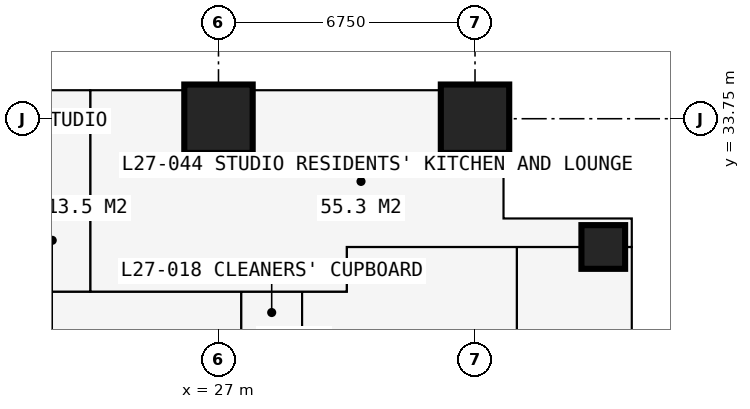
"""IFC4 building model, lengths in metres.
Left out: names, types, materials, properties, quantities, classifications, styles, units other than length and angle.
Written with IfcOpenShell. Run it as: python <this file> out.ifc"""

import sys

from ifc_helpers import new_model, si_unit, direction, frame, frame_2d, origin, origin_2d, place, context, subcontext, project, spatial, rectangle, extrude, element, fill, save


model = new_model("IFC4")
c1 = context("Model", 3, precision=1e-05, world=origin(), true_north=direction((0.0, 1.0)))
c2 = subcontext(c1, "Body", "Model", "MODEL_VIEW")
j1 = project(units=[si_unit("LENGTHUNIT", "METRE"), si_unit("PLANEANGLEUNIT", "RADIAN")], contexts=[c1])
p1 = place(None, origin())
s1 = spatial("IfcSite", under=j1, at=p1, CompositionType="ELEMENT")
p2 = place(p1, origin())
s2 = spatial("IfcBuilding", under=s1, at=p2, CompositionType="ELEMENT")
p3 = place(p2, frame((0.0, 0.0, 101.7)))
s3 = spatial("IfcBuildingStorey", under=s2, at=p3, CompositionType="ELEMENT", Elevation=101.7)
for number, where, z_axis, x_axis in (
    (1, (27.0, 33.75, 0.0), (0.0, 0.0, 1.0), (1.0, 0.0, 0.0)),
    (2, (33.75, 33.75, 0.0), (0.0, 0.0, 1.0), (1.0, 0.0, 0.0)),
):
    element("IfcColumn", number, at=place(p3, frame(where, z_axis=z_axis, x_axis=x_axis)), inside=s3, PredefinedType="COLUMN", context=c2, shape_type="SweptSolid", body=[
        extrude(rectangle(XDim=1.8, YDim=1.8, at=origin_2d()), origin(), (0.0, 0.0, 1.0), 3.6),
    ])
p4 = place(p3, frame((37.125, 30.375, 0.0), z_axis=(0.0, 0.0, 1.0), x_axis=(1.0, 0.0, 0.0)))
e3 = element("IfcColumn", 3, at=p4, inside=s3, PredefinedType="COLUMN", context=c2, shape_type="SweptSolid", body=[
    extrude(rectangle(XDim=1.15, YDim=1.15, at=origin_2d()), origin(), (0.0, 0.0, 1.0), 3.6),
])
p5 = place(p3, frame((37.875, 27.75, 0.0), z_axis=(0.0, 0.0, 1.0), x_axis=(0.0, 1.0, 0.0)))
e4 = element("IfcWall", 4, at=p5, inside=s3, PredefinedType="SOLIDWALL", context=c2, shape_type="SweptSolid", body=[
    extrude(rectangle(XDim=3.375, YDim=0.3, at=frame_2d((1.688, 0.0))), origin(), (0.0, 0.0, 1.0), 3.375),
])
p6 = place(p5, frame((0.788, 0.0, 0.6)))
e5 = element("IfcOpeningElement", 5, at=p6, cuts=e4, PredefinedType="OPENING", context=c2, shape_type="SweptSolid", body=[
    extrude(rectangle(XDim=1.8, YDim=2.1, at=frame_2d((0.9, 1.05))), frame((0.0, 0.16, 0.0), z_axis=(0.0, -1.0, 0.0), x_axis=(1.0, 0.0, 0.0)), (0.0, 0.0, 1.0), 0.32),
])
p7 = place(p3, frame((37.875, 31.125, 0.0), z_axis=(0.0, 0.0, 1.0), x_axis=(-1.0, 0.0, 0.0)))
e6 = element("IfcWall", 6, at=p7, inside=s3, PredefinedType="SOLIDWALL", context=c2, shape_type="SweptSolid", body=[
    extrude(rectangle(XDim=3.375, YDim=0.3, at=frame_2d((1.688, 0.0))), origin(), (0.0, 0.0, 1.0), 3.375),
])
p8 = place(p7, frame((0.788, 0.0, 0.6)))
e7 = element("IfcOpeningElement", 7, at=p8, cuts=e6, PredefinedType="OPENING", context=c2, shape_type="SweptSolid", body=[
    extrude(rectangle(XDim=1.8, YDim=2.1, at=frame_2d((0.9, 1.05))), frame((0.0, 0.16, 0.0), z_axis=(0.0, -1.0, 0.0), x_axis=(1.0, 0.0, 0.0)), (0.0, 0.0, 1.0), 0.32),
])
p9 = place(p3, frame((34.5, 31.125, 0.0), z_axis=(0.0, 0.0, 1.0), x_axis=(0.0, 1.0, 0.0)))
e8 = element("IfcWall", 8, at=p9, inside=s3, PredefinedType="SOLIDWALL", context=c2, shape_type="SweptSolid", body=[
    extrude(rectangle(XDim=3.375, YDim=0.3, at=frame_2d((1.688, 0.0))), origin(), (0.0, 0.0, 1.0), 3.375),
])
p10 = place(p9, frame((0.343, 0.0, 0.9)))
e9 = element("IfcOpeningElement", 9, at=p10, cuts=e8, PredefinedType="OPENING", context=c2, shape_type="SweptSolid", body=[
    extrude(rectangle(XDim=1.2, YDim=1.8, at=frame_2d((0.6, 0.9))), frame((0.0, 0.16, 0.0), z_axis=(0.0, -1.0, 0.0), x_axis=(1.0, 0.0, 0.0)), (0.0, 0.0, 1.0), 0.32),
])
p11 = place(p3, frame((11.3, 29.2, 0.0), z_axis=(0.0, 0.0, 1.0), x_axis=(1.0, 0.0, 0.0)))
e10 = element("IfcWall", 10, at=p11, inside=s3, PredefinedType="PARTITIONING", context=c2, shape_type="SweptSolid", body=[
    extrude(rectangle(XDim=19.075, YDim=0.15, at=frame_2d((9.538, 0.0))), origin(), (0.0, 0.0, 1.0), 3.375),
])
p12 = place(p11, frame((5.825, 0.0, 0.0)))
e11 = element("IfcOpeningElement", 11, at=p12, cuts=e10, PredefinedType="OPENING", context=c2, shape_type="SweptSolid", body=[
    extrude(rectangle(XDim=0.95, YDim=2.2, at=frame_2d((0.475, 1.1))), frame((0.0, 0.085, 0.0), z_axis=(0.0, -1.0, 0.0), x_axis=(1.0, 0.0, 0.0)), (0.0, 0.0, 1.0), 0.17),
])
p13 = place(p11, frame((9.2, 0.0, 0.0)))
e12 = element("IfcOpeningElement", 12, at=p13, cuts=e10, PredefinedType="OPENING", context=c2, shape_type="SweptSolid", body=[
    extrude(rectangle(XDim=0.95, YDim=2.2, at=frame_2d((0.475, 1.1))), frame((0.0, 0.085, 0.0), z_axis=(0.0, -1.0, 0.0), x_axis=(1.0, 0.0, 0.0)), (0.0, 0.0, 1.0), 0.17),
])
p14 = place(p11, frame((0.6, 0.0, 0.0)))
e13 = element("IfcOpeningElement", 13, at=p14, cuts=e10, PredefinedType="OPENING", context=c2, shape_type="SweptSolid", body=[
    extrude(rectangle(XDim=1.0, YDim=2.2, at=frame_2d((0.5, 1.1))), frame((0.0, 0.085, 0.0), z_axis=(0.0, -1.0, 0.0), x_axis=(1.0, 0.0, 0.0)), (0.0, 0.0, 1.0), 0.17),
])
p15 = place(p3, frame((21.625, 31.4, 0.0), z_axis=(0.0, 0.0, 1.0), x_axis=(1.0, 0.0, 0.0)))
e14 = element("IfcWall", 14, at=p15, inside=s3, PredefinedType="PARTITIONING", context=c2, shape_type="SweptSolid", body=[
    extrude(rectangle(XDim=2.0, YDim=0.1, at=frame_2d((1.0, 0.0))), origin(), (0.0, 0.0, 1.0), 3.375),
])
p16 = place(p3, frame((23.625, 29.2, 0.0), z_axis=(0.0, 0.0, 1.0), x_axis=(0.0, 1.0, 0.0)))
e15 = element("IfcWall", 15, at=p16, inside=s3, PredefinedType="PARTITIONING", context=c2, shape_type="SweptSolid", body=[
    extrude(rectangle(XDim=5.284, YDim=0.15, at=frame_2d((2.642, 0.0))), origin(), (0.0, 0.0, 1.0), 3.375),
])
p17 = place(p3, frame((27.6, 27.6, 0.0), z_axis=(0.0, 0.0, 1.0), x_axis=(0.0, 1.0, 0.0)))
e16 = element("IfcWall", 16, at=p17, inside=s3, PredefinedType="PARTITIONING", context=c2, shape_type="SweptSolid", body=[
    extrude(rectangle(XDim=1.6, YDim=0.15, at=frame_2d((0.8, 0.0))), origin(), (0.0, 0.0, 1.0), 3.375),
])
p18 = place(p17, frame((0.3, 0.0, 0.0)))
e17 = element("IfcOpeningElement", 17, at=p18, cuts=e16, PredefinedType="OPENING", context=c2, shape_type="SweptSolid", body=[
    extrude(rectangle(XDim=0.95, YDim=2.2, at=frame_2d((0.475, 1.1))), frame((0.0, 0.085, 0.0), z_axis=(0.0, -1.0, 0.0), x_axis=(1.0, 0.0, 0.0)), (0.0, 0.0, 1.0), 0.17),
])
p19 = place(p3, frame((29.2, 11.3, 0.0), z_axis=(0.0, 0.0, 1.0), x_axis=(0.0, 1.0, 0.0)))
e18 = element("IfcWall", 18, at=p19, inside=s3, PredefinedType="PARTITIONING", context=c2, shape_type="SweptSolid", body=[
    extrude(rectangle(XDim=17.9, YDim=0.2, at=frame_2d((8.95, 0.0))), origin(), (0.0, 0.0, 1.0), 3.375),
])
p20 = place(p19, frame((8.35, 0.0, 0.0)))
e19 = element("IfcOpeningElement", 19, at=p20, cuts=e18, PredefinedType="OPENING", context=c2, shape_type="SweptSolid", body=[
    extrude(rectangle(XDim=1.2, YDim=2.2, at=frame_2d((0.6, 1.1))), frame((0.0, 0.11, 0.0), z_axis=(0.0, -1.0, 0.0), x_axis=(1.0, 0.0, 0.0)), (0.0, 0.0, 1.0), 0.22),
])
p21 = place(p3, frame((30.375, 29.2, 0.0), z_axis=(0.0, 0.0, 1.0), x_axis=(0.0, 1.0, 0.0)))
e20 = element("IfcWall", 20, at=p21, inside=s3, PredefinedType="PARTITIONING", context=c2, shape_type="SweptSolid", body=[
    extrude(rectangle(XDim=1.175, YDim=0.15, at=frame_2d((0.587, 0.0))), origin(), (0.0, 0.0, 1.0), 3.375),
])
p22 = place(p3, frame((30.375, 30.375, 0.0), z_axis=(0.0, 0.0, 1.0), x_axis=(1.0, 0.0, 0.0)))
e21 = element("IfcWall", 21, at=p22, inside=s3, PredefinedType="PARTITIONING", context=c2, shape_type="SweptSolid", body=[
    extrude(rectangle(XDim=7.35, YDim=0.15, at=frame_2d((3.675, 0.0))), origin(), (0.0, 0.0, 1.0), 2.877),
])
p23 = place(p22, frame((5.125, 0.0, 0.0)))
e22 = element("IfcOpeningElement", 22, at=p23, cuts=e21, PredefinedType="OPENING", context=c2, shape_type="SweptSolid", body=[
    extrude(rectangle(XDim=1.0, YDim=2.2, at=frame_2d((0.5, 1.1))), frame((0.0, 0.085, 0.0), z_axis=(0.0, -1.0, 0.0), x_axis=(1.0, 0.0, 0.0)), (0.0, 0.0, 1.0), 0.17),
])
p24 = place(p3, frame((34.85, 12.55, 0.0), z_axis=(0.0, 0.0, 1.0), x_axis=(0.0, 1.0, 0.0)))
e23 = element("IfcWall", 23, at=p24, inside=s3, PredefinedType="PARTITIONING", context=c2, shape_type="SweptSolid", body=[
    extrude(rectangle(XDim=17.825, YDim=0.15, at=frame_2d((8.913, 0.0))), origin(), (0.0, 0.0, 1.0), 3.375),
])
p25 = place(p24, frame((8.6, 0.0, 0.0)))
e24 = element("IfcOpeningElement", 24, at=p25, cuts=e23, PredefinedType="OPENING", context=c2, shape_type="SweptSolid", body=[
    extrude(rectangle(XDim=0.95, YDim=2.2, at=frame_2d((0.475, 1.1))), frame((0.0, 0.085, 0.0), z_axis=(0.0, -1.0, 0.0), x_axis=(1.0, 0.0, 0.0)), (0.0, 0.0, 1.0), 0.17),
])
p26 = place(p6, origin())
e25 = element("IfcWindow", 25, at=p26, inside=s3, PartitioningType="SINGLE_PANEL", PredefinedType="WINDOW", context=c2, shape_type="SweptSolid", body=[
    extrude(rectangle(XDim=1.8, YDim=2.1, at=frame_2d((0.9, 1.05))), frame((0.0, 0.03, 0.0), z_axis=(0.0, -1.0, 0.0), x_axis=(1.0, 0.0, 0.0)), (0.0, 0.0, 1.0), 0.06),
])
fill(e5, e25)
p27 = place(p8, origin())
e26 = element("IfcWindow", 26, at=p27, inside=s3, PartitioningType="SINGLE_PANEL", PredefinedType="WINDOW", context=c2, shape_type="SweptSolid", body=[
    extrude(rectangle(XDim=1.8, YDim=2.1, at=frame_2d((0.9, 1.05))), frame((0.0, 0.03, 0.0), z_axis=(0.0, -1.0, 0.0), x_axis=(1.0, 0.0, 0.0)), (0.0, 0.0, 1.0), 0.06),
])
fill(e7, e26)
p28 = place(p10, origin())
e27 = element("IfcWindow", 27, at=p28, inside=s3, PartitioningType="SINGLE_PANEL", PredefinedType="WINDOW", context=c2, shape_type="SweptSolid", body=[
    extrude(rectangle(XDim=1.2, YDim=1.8, at=frame_2d((0.6, 0.9))), frame((0.0, 0.03, 0.0), z_axis=(0.0, -1.0, 0.0), x_axis=(1.0, 0.0, 0.0)), (0.0, 0.0, 1.0), 0.06),
])
fill(e9, e27)
p29 = place(p18, origin())
e28 = element("IfcDoor", 28, at=p29, inside=s3, OperationType="SINGLE_SWING_LEFT", PredefinedType="DOOR", context=c2, shape_type="SweptSolid", body=[
    extrude(rectangle(XDim=0.95, YDim=2.2, at=frame_2d((0.475, 1.1))), frame((0.0, 0.025, 0.0), z_axis=(0.0, -1.0, 0.0), x_axis=(1.0, 0.0, 0.0)), (0.0, 0.0, 1.0), 0.05),
])
fill(e17, e28)
p30 = place(p23, origin())
e29 = element("IfcDoor", 29, at=p30, inside=s3, OperationType="SINGLE_SWING_LEFT", PredefinedType="DOOR", context=c2, shape_type="SweptSolid", body=[
    extrude(rectangle(XDim=1.0, YDim=2.2, at=frame_2d((0.5, 1.1))), frame((0.0, 0.025, 0.0), z_axis=(0.0, -1.0, 0.0), x_axis=(1.0, 0.0, 0.0)), (0.0, 0.0, 1.0), 0.05),
])
fill(e22, e29)
save(model, sys.argv[1])
